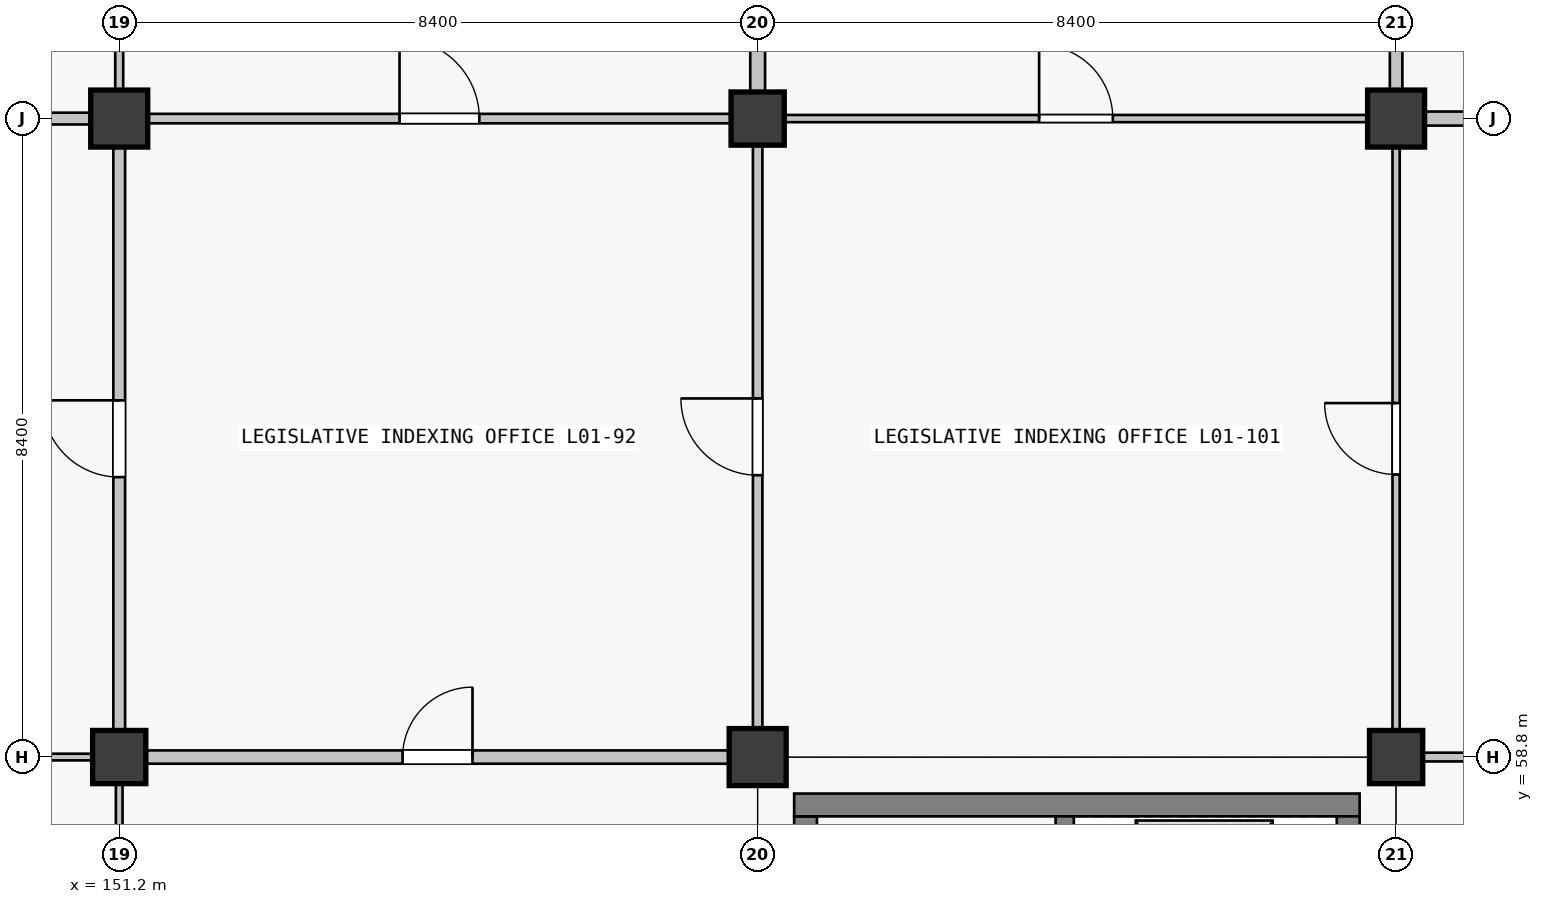
"""IFC4 building model, lengths in metres.
Left out: names, types, materials, properties, quantities, classifications, styles, units other than length and angle.
Written with IfcOpenShell. Run it as: python <this file> out.ifc"""

import sys

from ifc_helpers import new_model, si_unit, direction, frame, frame_2d, origin, origin_2d, place, context, subcontext, project, spatial, rectangle, extrude, element, fill, save


model = new_model("IFC4")
c1 = context("Model", 3, precision=1e-05, world=origin(), true_north=direction((0.0, 1.0)))
c2 = subcontext(c1, "Body", "Model", "MODEL_VIEW")
j1 = project(units=[si_unit("LENGTHUNIT", "METRE"), si_unit("PLANEANGLEUNIT", "RADIAN")], contexts=[c1])
p1 = place(None, origin())
s1 = spatial("IfcSite", under=j1, at=p1, CompositionType="ELEMENT")
p2 = place(p1, origin())
s2 = spatial("IfcBuilding", under=s1, at=p2, CompositionType="ELEMENT")
p3 = place(p2, frame((0.0, 0.0, 5.76)))
s3 = spatial("IfcBuildingStorey", under=s2, at=p3, CompositionType="ELEMENT", Elevation=5.76)
p4 = place(p3, frame((151.2, 58.8, 0.0), z_axis=(0.0, 0.0, 1.0), x_axis=(1.0, 0.0, 0.0)))
e1 = element("IfcColumn", 1, at=p4, inside=s3, PredefinedType="COLUMN", context=c2, shape_type="SweptSolid", body=[
    extrude(rectangle(XDim=0.7, YDim=0.7, at=origin_2d()), origin(), (0.0, 0.0, 1.0), 4.5),
])
for number, where, z_axis, x_axis in (
    (2, (151.2, 67.2, 0.0), (0.0, 0.0, 1.0), (1.0, 0.0, 0.0)),
    (3, (159.6, 58.8, 0.0), (0.0, 0.0, 1.0), (1.0, 0.0, 0.0)),
):
    element("IfcColumn", number, at=place(p3, frame(where, z_axis=z_axis, x_axis=x_axis)), inside=s3, PredefinedType="COLUMN", context=c2, shape_type="SweptSolid", body=[
        extrude(rectangle(XDim=0.75, YDim=0.75, at=origin_2d()), origin(), (0.0, 0.0, 1.0), 4.5),
    ])
for number, where, z_axis, x_axis in (
    (4, (159.6, 67.2, 0.0), (0.0, 0.0, 1.0), (1.0, 0.0, 0.0)),
    (5, (168.0, 58.8, 0.0), (0.0, 0.0, 1.0), (1.0, 0.0, 0.0)),
):
    element("IfcColumn", number, at=place(p3, frame(where, z_axis=z_axis, x_axis=x_axis)), inside=s3, PredefinedType="COLUMN", context=c2, shape_type="SweptSolid", body=[
        extrude(rectangle(XDim=0.7, YDim=0.7, at=origin_2d()), origin(), (0.0, 0.0, 1.0), 4.5),
    ])
p5 = place(p3, frame((168.0, 67.2, 0.0), z_axis=(0.0, 0.0, 1.0), x_axis=(1.0, 0.0, 0.0)))
e6 = element("IfcColumn", 6, at=p5, inside=s3, PredefinedType="COLUMN", context=c2, shape_type="SweptSolid", body=[
    extrude(rectangle(XDim=0.75, YDim=0.75, at=origin_2d()), origin(), (0.0, 0.0, 1.0), 4.5),
])
p6 = place(p3, frame((160.23, 51.18, 0.0), z_axis=(0.0, 0.0, 1.0), x_axis=(0.0, 1.0, 0.0)))
e7 = element("IfcWall", 7, at=p6, inside=s3, PredefinedType="SHEAR", context=c2, shape_type="SweptSolid", body=[
    extrude(rectangle(XDim=6.84, YDim=0.3, at=frame_2d((3.42, 0.0))), origin(), (0.0, 0.0, 1.0), 4.5),
])
p7 = place(p3, frame((160.08, 58.17, 0.0), z_axis=(0.0, 0.0, 1.0), x_axis=(1.0, 0.0, 0.0)))
e8 = element("IfcWall", 8, at=p7, inside=s3, PredefinedType="SHEAR", context=c2, shape_type="SweptSolid", body=[
    extrude(rectangle(XDim=7.44, YDim=0.3, at=frame_2d((3.72, 0.0))), origin(), (0.0, 0.0, 1.0), 4.5),
])
p8 = place(p3, frame((167.37, 58.02, 0.0), z_axis=(0.0, 0.0, 1.0), x_axis=(0.0, -1.0, 0.0)))
e9 = element("IfcWall", 9, at=p8, inside=s3, PredefinedType="SHEAR", context=c2, shape_type="SweptSolid", body=[
    extrude(rectangle(XDim=6.84, YDim=0.3, at=frame_2d((3.42, 0.0))), origin(), (0.0, 0.0, 1.0), 4.5),
])
p9 = place(p3, frame((163.64, 51.18, 0.0), z_axis=(0.0, 0.0, 1.0), x_axis=(0.0, 1.0, 0.0)))
e10 = element("IfcWall", 10, at=p9, inside=s3, PredefinedType="SHEAR", context=c2, shape_type="SweptSolid", body=[
    extrude(rectangle(XDim=6.84, YDim=0.24, at=frame_2d((3.42, 0.0))), origin(), (0.0, 0.0, 1.0), 4.5),
])
p10 = place(p9, frame((0.12, 0.0, 0.0)))
e11 = element("IfcOpeningElement", 11, at=p10, cuts=e10, PredefinedType="OPENING", context=c2, shape_type="SweptSolid", body=[
    extrude(rectangle(XDim=1.0, YDim=2.15, at=frame_2d((0.5, 1.075))), frame((0.0, 0.12, 0.0), z_axis=(0.0, -1.0, 0.0), x_axis=(1.0, 0.0, 0.0)), (0.0, 0.0, 1.0), 0.24),
])
p11 = place(p3, frame((143.177, 58.8, 0.0), z_axis=(0.0, 0.0, 1.0), x_axis=(1.0, 0.0, 0.0)))
e12 = element("IfcWall", 12, at=p11, inside=s3, PredefinedType="PARTITIONING", context=c2, shape_type="SweptSolid", body=[
    extrude(rectangle(XDim=7.671, YDim=0.088, at=frame_2d((3.835, 0.0))), origin(), (0.0, 0.0, 1.0), 2.4),
])
p12 = place(p3, frame((143.152, 67.2, 0.0), z_axis=(0.0, 0.0, 1.0), x_axis=(1.0, 0.0, 0.0)))
e13 = element("IfcWall", 13, at=p12, inside=s3, PredefinedType="PARTITIONING", context=c2, shape_type="SweptSolid", body=[
    extrude(rectangle(XDim=7.671, YDim=0.155, at=frame_2d((3.835, 0.0))), origin(), (0.0, 0.0, 1.0), 2.4),
])
p13 = place(p12, frame((3.336, 0.0, 0.0)))
e14 = element("IfcOpeningElement", 14, at=p13, cuts=e13, PredefinedType="OPENING", context=c2, shape_type="SweptSolid", body=[
    extrude(rectangle(XDim=1.0, YDim=2.2, at=frame_2d((0.5, 1.1))), frame((0.0, 0.078, 0.0), z_axis=(0.0, -1.0, 0.0), x_axis=(1.0, 0.0, 0.0)), (0.0, 0.0, 1.0), 0.155),
])
p14 = place(p3, frame((151.552, 58.8, 0.0), z_axis=(0.0, 0.0, 1.0), x_axis=(1.0, 0.0, 0.0)))
e15 = element("IfcWall", 15, at=p14, inside=s3, PredefinedType="PARTITIONING", context=c2, shape_type="SweptSolid", body=[
    extrude(rectangle(XDim=7.671, YDim=0.175, at=frame_2d((3.835, 0.0))), origin(), (0.0, 0.0, 1.0), 2.4),
])
p15 = place(p14, frame((3.376, 0.0, 0.0)))
e16 = element("IfcOpeningElement", 16, at=p15, cuts=e15, PredefinedType="OPENING", context=c2, shape_type="SweptSolid", body=[
    extrude(rectangle(XDim=0.92, YDim=2.15, at=frame_2d((0.46, 1.075))), frame((0.0, 0.087, 0.0), z_axis=(0.0, -1.0, 0.0), x_axis=(1.0, 0.0, 0.0)), (0.0, 0.0, 1.0), 0.175),
])
p16 = place(p3, frame((151.577, 67.2, 0.0), z_axis=(0.0, 0.0, 1.0), x_axis=(1.0, 0.0, 0.0)))
e17 = element("IfcWall", 17, at=p16, inside=s3, PredefinedType="PARTITIONING", context=c2, shape_type="SweptSolid", body=[
    extrude(rectangle(XDim=7.671, YDim=0.125, at=frame_2d((3.835, 0.0))), origin(), (0.0, 0.0, 1.0), 2.4),
])
p17 = place(p16, frame((3.311, 0.0, 0.0)))
e18 = element("IfcOpeningElement", 18, at=p17, cuts=e17, PredefinedType="OPENING", context=c2, shape_type="SweptSolid", body=[
    extrude(rectangle(XDim=1.05, YDim=2.12, at=frame_2d((0.525, 1.06))), frame((0.0, 0.062, 0.0), z_axis=(0.0, -1.0, 0.0), x_axis=(1.0, 0.0, 0.0)), (0.0, 0.0, 1.0), 0.125),
])
p18 = place(p3, frame((159.952, 67.2, 0.0), z_axis=(0.0, 0.0, 1.0), x_axis=(1.0, 0.0, 0.0)))
e19 = element("IfcWall", 19, at=p18, inside=s3, PredefinedType="PARTITIONING", context=c2, shape_type="SweptSolid", body=[
    extrude(rectangle(XDim=7.671, YDim=0.095, at=frame_2d((3.835, 0.0))), origin(), (0.0, 0.0, 1.0), 2.4),
])
p19 = place(p18, frame((3.351, 0.0, 0.0)))
e20 = element("IfcOpeningElement", 20, at=p19, cuts=e19, PredefinedType="OPENING", context=c2, shape_type="SweptSolid", body=[
    extrude(rectangle(XDim=0.97, YDim=2.12, at=frame_2d((0.485, 1.06))), frame((0.0, 0.047, 0.0), z_axis=(0.0, -1.0, 0.0), x_axis=(1.0, 0.0, 0.0)), (0.0, 0.0, 1.0), 0.095),
])
p20 = place(p3, frame((168.352, 58.8, 0.0), z_axis=(0.0, 0.0, 1.0), x_axis=(1.0, 0.0, 0.0)))
e21 = element("IfcWall", 21, at=p20, inside=s3, PredefinedType="PARTITIONING", context=c2, shape_type="SweptSolid", body=[
    extrude(rectangle(XDim=7.771, YDim=0.115, at=frame_2d((3.885, 0.0))), origin(), (0.0, 0.0, 1.0), 2.4),
])
p21 = place(p20, frame((3.385, 0.0, 0.0)))
e22 = element("IfcOpeningElement", 22, at=p21, cuts=e21, PredefinedType="OPENING", context=c2, shape_type="SweptSolid", body=[
    extrude(rectangle(XDim=1.0, YDim=2.2, at=frame_2d((0.5, 1.1))), frame((0.0, 0.058, 0.0), z_axis=(0.0, -1.0, 0.0), x_axis=(1.0, 0.0, 0.0)), (0.0, 0.0, 1.0), 0.115),
])
p22 = place(p3, frame((168.377, 67.2, 0.0), z_axis=(0.0, 0.0, 1.0), x_axis=(1.0, 0.0, 0.0)))
e23 = element("IfcWall", 23, at=p22, inside=s3, PredefinedType="PARTITIONING", context=c2, shape_type="SweptSolid", body=[
    extrude(rectangle(XDim=7.746, YDim=0.185, at=frame_2d((3.873, 0.0))), origin(), (0.0, 0.0, 1.0), 2.4),
])
p23 = place(p22, frame((3.383, 0.0, 0.0)))
e24 = element("IfcOpeningElement", 24, at=p23, cuts=e23, PredefinedType="OPENING", context=c2, shape_type="SweptSolid", body=[
    extrude(rectangle(XDim=0.98, YDim=2.18, at=frame_2d((0.49, 1.09))), frame((0.0, 0.093, 0.0), z_axis=(0.0, -1.0, 0.0), x_axis=(1.0, 0.0, 0.0)), (0.0, 0.0, 1.0), 0.185),
])
p24 = place(p3, frame((151.2, 50.777, 0.0), z_axis=(0.0, 0.0, 1.0), x_axis=(0.0, 1.0, 0.0)))
e25 = element("IfcWall", 25, at=p24, inside=s3, PredefinedType="PARTITIONING", context=c2, shape_type="SweptSolid", body=[
    extrude(rectangle(XDim=7.671, YDim=0.088, at=frame_2d((3.835, 0.0))), origin(), (0.0, 0.0, 1.0), 2.4),
])
p25 = place(p3, frame((151.2, 59.152, 0.0), z_axis=(0.0, 0.0, 1.0), x_axis=(0.0, 1.0, 0.0)))
e26 = element("IfcWall", 26, at=p25, inside=s3, PredefinedType="PARTITIONING", context=c2, shape_type="SweptSolid", body=[
    extrude(rectangle(XDim=7.671, YDim=0.155, at=frame_2d((3.835, 0.0))), origin(), (0.0, 0.0, 1.0), 2.4),
])
p26 = place(p25, frame((3.331, 0.0, 0.0)))
e27 = element("IfcOpeningElement", 27, at=p26, cuts=e26, PredefinedType="OPENING", context=c2, shape_type="SweptSolid", body=[
    extrude(rectangle(XDim=1.01, YDim=2.12, at=frame_2d((0.505, 1.06))), frame((0.0, 0.078, 0.0), z_axis=(0.0, -1.0, 0.0), x_axis=(1.0, 0.0, 0.0)), (0.0, 0.0, 1.0), 0.155),
])
p27 = place(p3, frame((151.2, 67.577, 0.0), z_axis=(0.0, 0.0, 1.0), x_axis=(0.0, 1.0, 0.0)))
e28 = element("IfcWall", 28, at=p27, inside=s3, PredefinedType="PARTITIONING", context=c2, shape_type="SweptSolid", body=[
    extrude(rectangle(XDim=7.746, YDim=0.105, at=frame_2d((3.873, 0.0))), origin(), (0.0, 0.0, 1.0), 2.4),
])
p28 = place(p27, frame((3.388, 0.0, 0.0)))
e29 = element("IfcOpeningElement", 29, at=p28, cuts=e28, PredefinedType="OPENING", context=c2, shape_type="SweptSolid", body=[
    extrude(rectangle(XDim=0.97, YDim=2.12, at=frame_2d((0.485, 1.06))), frame((0.0, 0.052, 0.0), z_axis=(0.0, -1.0, 0.0), x_axis=(1.0, 0.0, 0.0)), (0.0, 0.0, 1.0), 0.105),
])
p29 = place(p3, frame((159.6, 59.177, 0.0), z_axis=(0.0, 0.0, 1.0), x_axis=(0.0, 1.0, 0.0)))
e30 = element("IfcWall", 30, at=p29, inside=s3, PredefinedType="PARTITIONING", context=c2, shape_type="SweptSolid", body=[
    extrude(rectangle(XDim=7.671, YDim=0.125, at=frame_2d((3.835, 0.0))), origin(), (0.0, 0.0, 1.0), 2.4),
])
p30 = place(p29, frame((3.331, 0.0, 0.0)))
e31 = element("IfcOpeningElement", 31, at=p30, cuts=e30, PredefinedType="OPENING", context=c2, shape_type="SweptSolid", body=[
    extrude(rectangle(XDim=1.01, YDim=2.12, at=frame_2d((0.505, 1.06))), frame((0.0, 0.062, 0.0), z_axis=(0.0, -1.0, 0.0), x_axis=(1.0, 0.0, 0.0)), (0.0, 0.0, 1.0), 0.125),
])
p31 = place(p3, frame((159.6, 67.552, 0.0), z_axis=(0.0, 0.0, 1.0), x_axis=(0.0, 1.0, 0.0)))
e32 = element("IfcWall", 32, at=p31, inside=s3, PredefinedType="PARTITIONING", context=c2, shape_type="SweptSolid", body=[
    extrude(rectangle(XDim=7.771, YDim=0.195, at=frame_2d((3.885, 0.0))), origin(), (0.0, 0.0, 1.0), 2.4),
])
p32 = place(p31, frame((3.365, 0.0, 0.0)))
e33 = element("IfcOpeningElement", 33, at=p32, cuts=e32, PredefinedType="OPENING", context=c2, shape_type="SweptSolid", body=[
    extrude(rectangle(XDim=1.04, YDim=2.2, at=frame_2d((0.52, 1.1))), frame((0.0, 0.098, 0.0), z_axis=(0.0, -1.0, 0.0), x_axis=(1.0, 0.0, 0.0)), (0.0, 0.0, 1.0), 0.195),
])
p33 = place(p3, frame((168.0, 59.152, 0.0), z_axis=(0.0, 0.0, 1.0), x_axis=(0.0, 1.0, 0.0)))
e34 = element("IfcWall", 34, at=p33, inside=s3, PredefinedType="PARTITIONING", context=c2, shape_type="SweptSolid", body=[
    extrude(rectangle(XDim=7.671, YDim=0.095, at=frame_2d((3.835, 0.0))), origin(), (0.0, 0.0, 1.0), 2.4),
])
p34 = place(p33, frame((3.365, 0.0, 0.0)))
e35 = element("IfcOpeningElement", 35, at=p34, cuts=e34, PredefinedType="OPENING", context=c2, shape_type="SweptSolid", body=[
    extrude(rectangle(XDim=0.94, YDim=2.15, at=frame_2d((0.47, 1.075))), frame((0.0, 0.047, 0.0), z_axis=(0.0, -1.0, 0.0), x_axis=(1.0, 0.0, 0.0)), (0.0, 0.0, 1.0), 0.095),
])
p35 = place(p3, frame((168.0, 67.577, 0.0), z_axis=(0.0, 0.0, 1.0), x_axis=(0.0, 1.0, 0.0)))
e36 = element("IfcWall", 36, at=p35, inside=s3, PredefinedType="PARTITIONING", context=c2, shape_type="SweptSolid", body=[
    extrude(rectangle(XDim=7.746, YDim=0.165, at=frame_2d((3.873, 0.0))), origin(), (0.0, 0.0, 1.0), 2.4),
])
p36 = place(p35, frame((3.413, 0.0, 0.0)))
e37 = element("IfcOpeningElement", 37, at=p36, cuts=e36, PredefinedType="OPENING", context=c2, shape_type="SweptSolid", body=[
    extrude(rectangle(XDim=0.92, YDim=2.15, at=frame_2d((0.46, 1.075))), frame((0.0, 0.083, 0.0), z_axis=(0.0, -1.0, 0.0), x_axis=(1.0, 0.0, 0.0)), (0.0, 0.0, 1.0), 0.165),
])
p37 = place(p15, origin())
e38 = element("IfcDoor", 38, at=p37, inside=s3, OperationType="SINGLE_SWING_RIGHT", PredefinedType="DOOR", context=c2, shape_type="SweptSolid", body=[
    extrude(rectangle(XDim=0.92, YDim=2.15, at=frame_2d((0.46, 1.075))), frame((0.0, 0.025, 0.0), z_axis=(0.0, -1.0, 0.0), x_axis=(1.0, 0.0, 0.0)), (0.0, 0.0, 1.0), 0.05),
])
fill(e16, e38)
p38 = place(p17, origin())
e39 = element("IfcDoor", 39, at=p38, inside=s3, OperationType="SINGLE_SWING_LEFT", PredefinedType="DOOR", context=c2, shape_type="SweptSolid", body=[
    extrude(rectangle(XDim=1.05, YDim=2.12, at=frame_2d((0.525, 1.06))), frame((0.0, 0.025, 0.0), z_axis=(0.0, -1.0, 0.0), x_axis=(1.0, 0.0, 0.0)), (0.0, 0.0, 1.0), 0.05),
])
fill(e18, e39)
p39 = place(p19, origin())
e40 = element("IfcDoor", 40, at=p39, inside=s3, OperationType="SINGLE_SWING_LEFT", PredefinedType="DOOR", context=c2, shape_type="SweptSolid", body=[
    extrude(rectangle(XDim=0.97, YDim=2.12, at=frame_2d((0.485, 1.06))), frame((0.0, 0.025, 0.0), z_axis=(0.0, -1.0, 0.0), x_axis=(1.0, 0.0, 0.0)), (0.0, 0.0, 1.0), 0.05),
])
fill(e20, e40)
p40 = place(p30, origin())
e41 = element("IfcDoor", 41, at=p40, inside=s3, OperationType="SINGLE_SWING_RIGHT", PredefinedType="DOOR", context=c2, shape_type="SweptSolid", body=[
    extrude(rectangle(XDim=1.01, YDim=2.12, at=frame_2d((0.505, 1.06))), frame((0.0, 0.025, 0.0), z_axis=(0.0, -1.0, 0.0), x_axis=(1.0, 0.0, 0.0)), (0.0, 0.0, 1.0), 0.05),
])
fill(e31, e41)
p41 = place(p26, origin())
e42 = element("IfcDoor", 42, at=p41, inside=s3, OperationType="SINGLE_SWING_RIGHT", PredefinedType="DOOR", context=c2, shape_type="SweptSolid", body=[
    extrude(rectangle(XDim=1.01, YDim=2.12, at=frame_2d((0.505, 1.06))), frame((0.0, 0.025, 0.0), z_axis=(0.0, -1.0, 0.0), x_axis=(1.0, 0.0, 0.0)), (0.0, 0.0, 1.0), 0.05),
])
fill(e27, e42)
p42 = place(p34, origin())
e43 = element("IfcDoor", 43, at=p42, inside=s3, OperationType="SINGLE_SWING_RIGHT", PredefinedType="DOOR", context=c2, shape_type="SweptSolid", body=[
    extrude(rectangle(XDim=0.94, YDim=2.15, at=frame_2d((0.47, 1.075))), frame((0.0, 0.025, 0.0), z_axis=(0.0, -1.0, 0.0), x_axis=(1.0, 0.0, 0.0)), (0.0, 0.0, 1.0), 0.05),
])
fill(e35, e43)
save(model, sys.argv[1])
